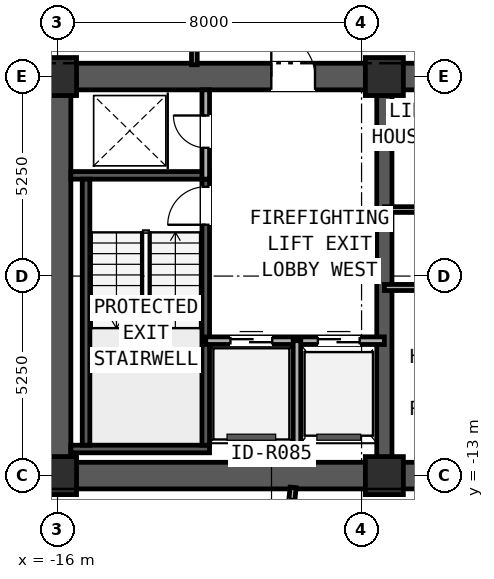
"""IFC4 building model, lengths in metres.
Left out: names, types, materials, properties, quantities, classifications, styles, units other than length and angle.
Written with IfcOpenShell. Run it as: python <this file> out.ifc"""

import sys

from ifc_helpers import new_model, si_unit, direction, frame, frame_2d, origin, origin_2d, place, context, subcontext, project, spatial, rectangle, extrude, element, fill, save


model = new_model("IFC4")
c1 = context("Model", 3, precision=1e-05, world=origin(), true_north=direction((0.0, 1.0)))
c2 = subcontext(c1, "Body", "Model", "MODEL_VIEW")
j1 = project(units=[si_unit("LENGTHUNIT", "METRE"), si_unit("PLANEANGLEUNIT", "RADIAN")], contexts=[c1])
p1 = place(None, origin())
s1 = spatial("IfcSite", under=j1, at=p1, CompositionType="ELEMENT")
p2 = place(p1, origin())
s2 = spatial("IfcBuilding", under=s1, at=p2, CompositionType="ELEMENT")
p3 = place(p2, frame((0.0, 0.0, 166.95)))
s3 = spatial("IfcBuildingStorey", under=s2, at=p3, CompositionType="ELEMENT", Elevation=166.95)
p4 = place(p3, frame((-16.35, -13.0, 0.0), z_axis=(0.0, 0.0, 1.0), x_axis=(1.0, 0.0, 0.0)))
e1 = element("IfcWall", 1, at=p4, inside=s3, PredefinedType="SHEAR", context=c2, shape_type="SweptSolid", body=[
    extrude(rectangle(XDim=32.7, YDim=0.7, at=frame_2d((16.35, 0.0))), origin(), (0.0, 0.0, 1.0), 2.91),
])
p5 = place(p3, frame((-16.35, -2.5, 0.0), z_axis=(0.0, 0.0, 1.0), x_axis=(1.0, 0.0, 0.0)))
e2 = element("IfcWall", 2, at=p5, inside=s3, PredefinedType="SHEAR", context=c2, shape_type="SweptSolid", body=[
    extrude(rectangle(XDim=32.7, YDim=0.7, at=frame_2d((16.35, 0.0))), origin(), (0.0, 0.0, 1.0), 2.91),
])
p6 = place(p5, frame((5.975, 0.0, 0.0)))
e3 = element("IfcOpeningElement", 3, at=p6, cuts=e2, PredefinedType="OPENING", context=c2, shape_type="SweptSolid", body=[
    extrude(rectangle(XDim=1.15, YDim=2.0, at=frame_2d((0.575, 1.0))), frame((0.0, 0.36, 0.0), z_axis=(0.0, -1.0, 0.0), x_axis=(1.0, 0.0, 0.0)), (0.0, 0.0, 1.0), 0.72),
])
p7 = place(p5, frame((15.55, 0.0, 0.0)))
e4 = element("IfcOpeningElement", 4, at=p7, cuts=e2, PredefinedType="OPENING", context=c2, shape_type="SweptSolid", body=[
    extrude(rectangle(XDim=1.6, YDim=2.0, at=frame_2d((0.8, 1.0))), frame((0.0, 0.36, 0.0), z_axis=(0.0, -1.0, 0.0), x_axis=(1.0, 0.0, 0.0)), (0.0, 0.0, 1.0), 0.72),
])
p8 = place(p5, frame((25.575, 0.0, 0.0)))
e5 = element("IfcOpeningElement", 5, at=p8, cuts=e2, PredefinedType="OPENING", context=c2, shape_type="SweptSolid", body=[
    extrude(rectangle(XDim=1.15, YDim=2.0, at=frame_2d((0.575, 1.0))), frame((0.0, 0.36, 0.0), z_axis=(0.0, -1.0, 0.0), x_axis=(1.0, 0.0, 0.0)), (0.0, 0.0, 1.0), 0.72),
])
p9 = place(p3, frame((-16.0, -12.65, 0.0), z_axis=(0.0, 0.0, 1.0), x_axis=(0.0, 1.0, 0.0)))
e6 = element("IfcWall", 6, at=p9, inside=s3, PredefinedType="SHEAR", context=c2, shape_type="SweptSolid", body=[
    extrude(rectangle(XDim=9.8, YDim=0.7, at=frame_2d((4.9, 0.0))), origin(), (0.0, 0.0, 1.0), 2.91),
])
p10 = place(p3, frame((-7.4, -12.65, 0.0), z_axis=(0.0, 0.0, 1.0), x_axis=(0.0, 1.0, 0.0)))
e7 = element("IfcWall", 7, at=p10, inside=s3, PredefinedType="SHEAR", context=c2, shape_type="SweptSolid", body=[
    extrude(rectangle(XDim=9.8, YDim=0.4, at=frame_2d((4.9, 0.0))), origin(), (0.0, 0.0, 1.0), 3.19),
])
for number, where, z_axis, x_axis in (
    (8, (-15.65, -12.3, 0.0), (0.0, 0.0, 1.0), (1.0, 0.0, 0.0)),
    (9, (-15.65, -5.1, 0.0), (0.0, 0.0, 1.0), (1.0, 0.0, 0.0)),
):
    element("IfcWall", number, at=place(p3, frame(where, z_axis=z_axis, x_axis=x_axis)), inside=s3, PredefinedType="SOLIDWALL", context=c2, shape_type="SweptSolid", body=[
        extrude(rectangle(XDim=3.65, YDim=0.2, at=frame_2d((1.825, 0.0))), origin(), (0.0, 0.0, 1.0), 3.19),
    ])
p11 = place(p3, frame((-15.25, -12.2, 0.0), z_axis=(0.0, 0.0, 1.0), x_axis=(0.0, 1.0, 0.0)))
e10 = element("IfcWall", 10, at=p11, inside=s3, PredefinedType="SOLIDWALL", context=c2, shape_type="SweptSolid", body=[
    extrude(rectangle(XDim=7.0, YDim=0.2, at=frame_2d((3.5, 0.0))), origin(), (0.0, 0.0, 1.0), 3.19),
])
p12 = place(p3, frame((-12.1, -12.2, 0.0), z_axis=(0.0, 0.0, 1.0), x_axis=(0.0, 1.0, 0.0)))
e11 = element("IfcWall", 11, at=p12, inside=s3, PredefinedType="SOLIDWALL", context=c2, shape_type="SweptSolid", body=[
    extrude(rectangle(XDim=7.0, YDim=0.2, at=frame_2d((3.5, 0.0))), origin(), (0.0, 0.0, 1.0), 3.19),
])
p13 = place(p12, frame((5.8, 0.0, 0.0)))
e12 = element("IfcOpeningElement", 12, at=p13, cuts=e11, PredefinedType="OPENING", context=c2, shape_type="SweptSolid", body=[
    extrude(rectangle(XDim=1.0, YDim=2.1, at=frame_2d((0.5, 1.05))), frame((0.0, 0.11, 0.0), z_axis=(0.0, -1.0, 0.0), x_axis=(1.0, 0.0, 0.0)), (0.0, 0.0, 1.0), 0.22),
])
for number, where, z_axis, x_axis in (
    (13, (-16.0, -13.0, 0.0), (0.0, 0.0, 1.0), (1.0, 0.0, 0.0)),
    (14, (-7.4, -13.0, 0.0), (0.0, 0.0, 1.0), (1.0, 0.0, 0.0)),
    (15, (-16.0, -2.5, 0.0), (0.0, 0.0, 1.0), (1.0, 0.0, 0.0)),
    (16, (-7.4, -2.5, 0.0), (0.0, 0.0, 1.0), (1.0, 0.0, 0.0)),
):
    element("IfcColumn", number, at=place(p3, frame(where, z_axis=z_axis, x_axis=x_axis)), inside=s3, PredefinedType="COLUMN", context=c2, shape_type="SweptSolid", body=[
        extrude(rectangle(XDim=1.0, YDim=1.0, at=origin_2d()), origin(), (0.0, 0.0, 1.0), 3.45),
    ])
p14 = place(p3, frame((-26.695, -13.016, 0.0), z_axis=(0.0, 0.0, 1.0), x_axis=(0.995396268366, -0.095845025554, 0.0)))
e17 = element("IfcWall", 17, at=p14, inside=s3, PredefinedType="STANDARD", context=c2, shape_type="SweptSolid", body=[
    extrude(rectangle(XDim=49.6, YDim=0.24, at=frame_2d((24.8, 0.0))), origin(), (0.0, 0.0, 1.0), 3.19),
])
p15 = place(p14, frame((6.044, 0.0, 0.7)))
e18 = element("IfcOpeningElement", 18, at=p15, cuts=e17, PredefinedType="OPENING", context=c2, shape_type="SweptSolid", body=[
    extrude(rectangle(XDim=1.8, YDim=1.5, at=frame_2d((0.9, 0.75))), frame((0.0, 0.13, 0.0), z_axis=(0.0, -1.0, 0.0), x_axis=(1.0, 0.0, 0.0)), (0.0, 0.0, 1.0), 0.26),
])
p16 = place(p14, frame((41.756, 0.0, 0.7)))
e19 = element("IfcOpeningElement", 19, at=p16, cuts=e17, PredefinedType="OPENING", context=c2, shape_type="SweptSolid", body=[
    extrude(rectangle(XDim=1.8, YDim=1.5, at=frame_2d((0.9, 0.75))), frame((0.0, 0.13, 0.0), z_axis=(0.0, -1.0, 0.0), x_axis=(1.0, 0.0, 0.0)), (0.0, 0.0, 1.0), 0.26),
])
p17 = place(p3, frame((-12.1, -5.2, 0.0), z_axis=(0.0, 0.0, 1.0), x_axis=(0.0, 1.0, 0.0)))
e20 = element("IfcWall", 20, at=p17, inside=s3, PredefinedType="PARTITIONING", context=c2, shape_type="SweptSolid", body=[
    extrude(rectangle(XDim=2.35, YDim=0.2, at=frame_2d((1.175, 0.0))), origin(), (0.0, 0.0, 1.0), 2.225),
])
p18 = place(p17, frame((0.825, 0.0, 0.0)))
e21 = element("IfcOpeningElement", 21, at=p18, cuts=e20, PredefinedType="OPENING", context=c2, shape_type="SweptSolid", body=[
    extrude(rectangle(XDim=0.85, YDim=2.05, at=frame_2d((0.425, 1.025))), frame((0.0, 0.11, 0.0), z_axis=(0.0, -1.0, 0.0), x_axis=(1.0, 0.0, 0.0)), (0.0, 0.0, 1.0), 0.22),
])
p19 = place(p3, frame((-12.1, -9.45, 0.0), z_axis=(0.0, 0.0, 1.0), x_axis=(1.0, 0.0, 0.0)))
e22 = element("IfcWall", 22, at=p19, inside=s3, PredefinedType="PARTITIONING", context=c2, shape_type="SweptSolid", body=[
    extrude(rectangle(XDim=4.7, YDim=0.2, at=frame_2d((2.35, 0.0))), origin(), (0.0, 0.0, 1.0), 3.19),
])
p20 = place(p19, frame((0.65, 0.0, 0.0)))
e23 = element("IfcOpeningElement", 23, at=p20, cuts=e22, PredefinedType="OPENING", context=c2, shape_type="SweptSolid", body=[
    extrude(rectangle(XDim=1.1, YDim=2.2, at=frame_2d((0.55, 1.1))), frame((0.0, 0.11, 0.0), z_axis=(0.0, -1.0, 0.0), x_axis=(1.0, 0.0, 0.0)), (0.0, 0.0, 1.0), 0.22),
])
p21 = place(p19, frame((2.95, 0.0, 0.0)))
e24 = element("IfcOpeningElement", 24, at=p21, cuts=e22, PredefinedType="OPENING", context=c2, shape_type="SweptSolid", body=[
    extrude(rectangle(XDim=1.1, YDim=2.2, at=frame_2d((0.55, 1.1))), frame((0.0, 0.11, 0.0), z_axis=(0.0, -1.0, 0.0), x_axis=(1.0, 0.0, 0.0)), (0.0, 0.0, 1.0), 0.22),
])
p22 = place(p3, frame((-9.7, -12.65, 0.0), z_axis=(0.0, 0.0, 1.0), x_axis=(0.0, 1.0, 0.0)))
e25 = element("IfcWall", 25, at=p22, inside=s3, PredefinedType="PARTITIONING", context=c2, shape_type="SweptSolid", body=[
    extrude(rectangle(XDim=3.2, YDim=0.2, at=frame_2d((1.6, 0.0))), origin(), (0.0, 0.0, 1.0), 2.225),
])
p23 = place(p3, frame((-7.4, -8.05, 0.0), z_axis=(0.0, 0.0, 1.0), x_axis=(1.0, 0.0, 0.0)))
e26 = element("IfcWall", 26, at=p23, inside=s3, PredefinedType="PARTITIONING", context=c2, shape_type="SweptSolid", body=[
    extrude(rectangle(XDim=4.85, YDim=0.16, at=frame_2d((2.425, 0.0))), origin(), (0.0, 0.0, 1.0), 3.19),
])
p24 = place(p23, frame((2.125, 0.0, 0.0)))
e27 = element("IfcOpeningElement", 27, at=p24, cuts=e26, PredefinedType="OPENING", context=c2, shape_type="SweptSolid", body=[
    extrude(rectangle(XDim=0.95, YDim=2.15, at=frame_2d((0.475, 1.075))), frame((0.0, 0.09, 0.0), z_axis=(0.0, -1.0, 0.0), x_axis=(1.0, 0.0, 0.0)), (0.0, 0.0, 1.0), 0.18),
])
p25 = place(p3, frame((-7.4, -6.0, 0.0), z_axis=(0.0, 0.0, 1.0), x_axis=(1.0, 0.0, 0.0)))
e28 = element("IfcWall", 28, at=p25, inside=s3, PredefinedType="PARTITIONING", context=c2, shape_type="SweptSolid", body=[
    extrude(rectangle(XDim=5.8, YDim=0.15, at=frame_2d((2.9, 0.0))), origin(), (0.0, 0.0, 1.0), 3.19),
])
p26 = place(p25, frame((1.05, 0.0, 0.0)))
e29 = element("IfcOpeningElement", 29, at=p26, cuts=e28, PredefinedType="OPENING", context=c2, shape_type="SweptSolid", body=[
    extrude(rectangle(XDim=0.9, YDim=2.1, at=frame_2d((0.45, 1.05))), frame((0.0, 0.085, 0.0), z_axis=(0.0, -1.0, 0.0), x_axis=(1.0, 0.0, 0.0)), (0.0, 0.0, 1.0), 0.17),
])
p27 = place(p25, frame((3.85, 0.0, 0.0)))
e30 = element("IfcOpeningElement", 30, at=p27, cuts=e28, PredefinedType="OPENING", context=c2, shape_type="SweptSolid", body=[
    extrude(rectangle(XDim=0.9, YDim=2.1, at=frame_2d((0.45, 1.05))), frame((0.0, 0.085, 0.0), z_axis=(0.0, -1.0, 0.0), x_axis=(1.0, 0.0, 0.0)), (0.0, 0.0, 1.0), 0.17),
])
p28 = place(p3, frame((-12.4, -2.19, 0.0), z_axis=(0.0, 0.0, 1.0), x_axis=(0.0, 1.0, 0.0)))
e31 = element("IfcWall", 31, at=p28, inside=s3, PredefinedType="PARTITIONING", context=c2, shape_type="SweptSolid", body=[
    extrude(rectangle(XDim=2.78, YDim=0.15, at=frame_2d((1.39, 0.0))), origin(), (0.0, 0.0, 1.0), 2.225),
])
p29 = place(p3, frame((-16.847, -3.468, 0.0), z_axis=(0.0, 0.0, 1.0), x_axis=(0.095854804219, 0.995395326746, 0.0)))
e32 = element("IfcWall", 32, at=p29, inside=s3, PredefinedType="PARTITIONING", context=c2, shape_type="SweptSolid", body=[
    extrude(rectangle(XDim=10.356, YDim=0.16, at=frame_2d((5.178, 0.0))), origin(), (0.0, 0.0, 1.0), 2.479),
])
p30 = place(p3, frame((-9.802, -13.31, 0.0), z_axis=(0.0, 0.0, 1.0), x_axis=(-0.095930256126, -0.995388057975, 0.0)))
e33 = element("IfcWall", 33, at=p30, inside=s3, PredefinedType="PARTITIONING", context=c2, shape_type="SweptSolid", body=[
    extrude(rectangle(XDim=1.367, YDim=0.16, at=frame_2d((0.683, 0.0))), origin(), (0.0, 0.0, 1.0), 2.225),
])
p31 = place(p30, frame((0.306, 0.0, 0.0)))
e34 = element("IfcOpeningElement", 34, at=p31, cuts=e33, PredefinedType="OPENING", context=c2, shape_type="SweptSolid", body=[
    extrude(rectangle(XDim=0.85, YDim=2.05, at=frame_2d((0.425, 1.025))), frame((0.0, 0.09, 0.0), z_axis=(0.0, -1.0, 0.0), x_axis=(1.0, 0.0, 0.0)), (0.0, 0.0, 1.0), 0.18),
])
p32 = place(p13, frame((1.0, 0.0, 0.0), z_axis=(0.0, 0.0, 1.0), x_axis=(-1.0, 0.0, 0.0)))
e35 = element("IfcDoor", 35, at=p32, inside=s3, OperationType="SINGLE_SWING_LEFT", PredefinedType="DOOR", context=c2, shape_type="SweptSolid", body=[
    extrude(rectangle(XDim=1.0, YDim=2.1, at=frame_2d((0.5, 1.05))), frame((0.0, 0.025, 0.0), z_axis=(0.0, -1.0, 0.0), x_axis=(1.0, 0.0, 0.0)), (0.0, 0.0, 1.0), 0.05),
])
fill(e12, e35)
p33 = place(p18, origin())
e36 = element("IfcDoor", 36, at=p33, inside=s3, OperationType="SINGLE_SWING_RIGHT", PredefinedType="DOOR", context=c2, shape_type="SweptSolid", body=[
    extrude(rectangle(XDim=0.85, YDim=2.05, at=frame_2d((0.425, 1.025))), frame((0.0, 0.025, 0.0), z_axis=(0.0, -1.0, 0.0), x_axis=(1.0, 0.0, 0.0)), (0.0, 0.0, 1.0), 0.05),
])
fill(e21, e36)
p34 = place(p20, origin())
e37 = element("IfcDoor", 37, at=p34, inside=s3, OperationType="SLIDING_TO_LEFT", PredefinedType="DOOR", context=c2, shape_type="SweptSolid", body=[
    extrude(rectangle(XDim=1.1, YDim=2.2, at=frame_2d((0.55, 1.1))), frame((0.0, 0.025, 0.0), z_axis=(0.0, -1.0, 0.0), x_axis=(1.0, 0.0, 0.0)), (0.0, 0.0, 1.0), 0.05),
])
fill(e23, e37)
p35 = place(p21, origin())
e38 = element("IfcDoor", 38, at=p35, inside=s3, OperationType="SLIDING_TO_RIGHT", PredefinedType="DOOR", context=c2, shape_type="SweptSolid", body=[
    extrude(rectangle(XDim=1.1, YDim=2.2, at=frame_2d((0.55, 1.1))), frame((0.0, 0.025, 0.0), z_axis=(0.0, -1.0, 0.0), x_axis=(1.0, 0.0, 0.0)), (0.0, 0.0, 1.0), 0.05),
])
fill(e24, e38)
p36 = place(p6, origin())
e39 = element("IfcDoor", 39, at=p36, inside=s3, OperationType="SINGLE_SWING_LEFT", PredefinedType="DOOR", context=c2, shape_type="SweptSolid", body=[
    extrude(rectangle(XDim=1.15, YDim=2.0, at=frame_2d((0.575, 1.0))), frame((0.0, 0.025, 0.0), z_axis=(0.0, -1.0, 0.0), x_axis=(1.0, 0.0, 0.0)), (0.0, 0.0, 1.0), 0.05),
])
fill(e3, e39)
p37 = place(p31, frame((0.85, 0.0, 0.0), z_axis=(0.0, 0.0, 1.0), x_axis=(-1.0, 0.0, 0.0)))
e40 = element("IfcDoor", 40, at=p37, inside=s3, OperationType="SINGLE_SWING_RIGHT", PredefinedType="DOOR", context=c2, shape_type="SweptSolid", body=[
    extrude(rectangle(XDim=0.85, YDim=2.05, at=frame_2d((0.425, 1.025))), frame((0.0, 0.025, 0.0), z_axis=(0.0, -1.0, 0.0), x_axis=(1.0, 0.0, 0.0)), (0.0, 0.0, 1.0), 0.05),
])
fill(e34, e40)
save(model, sys.argv[1])
